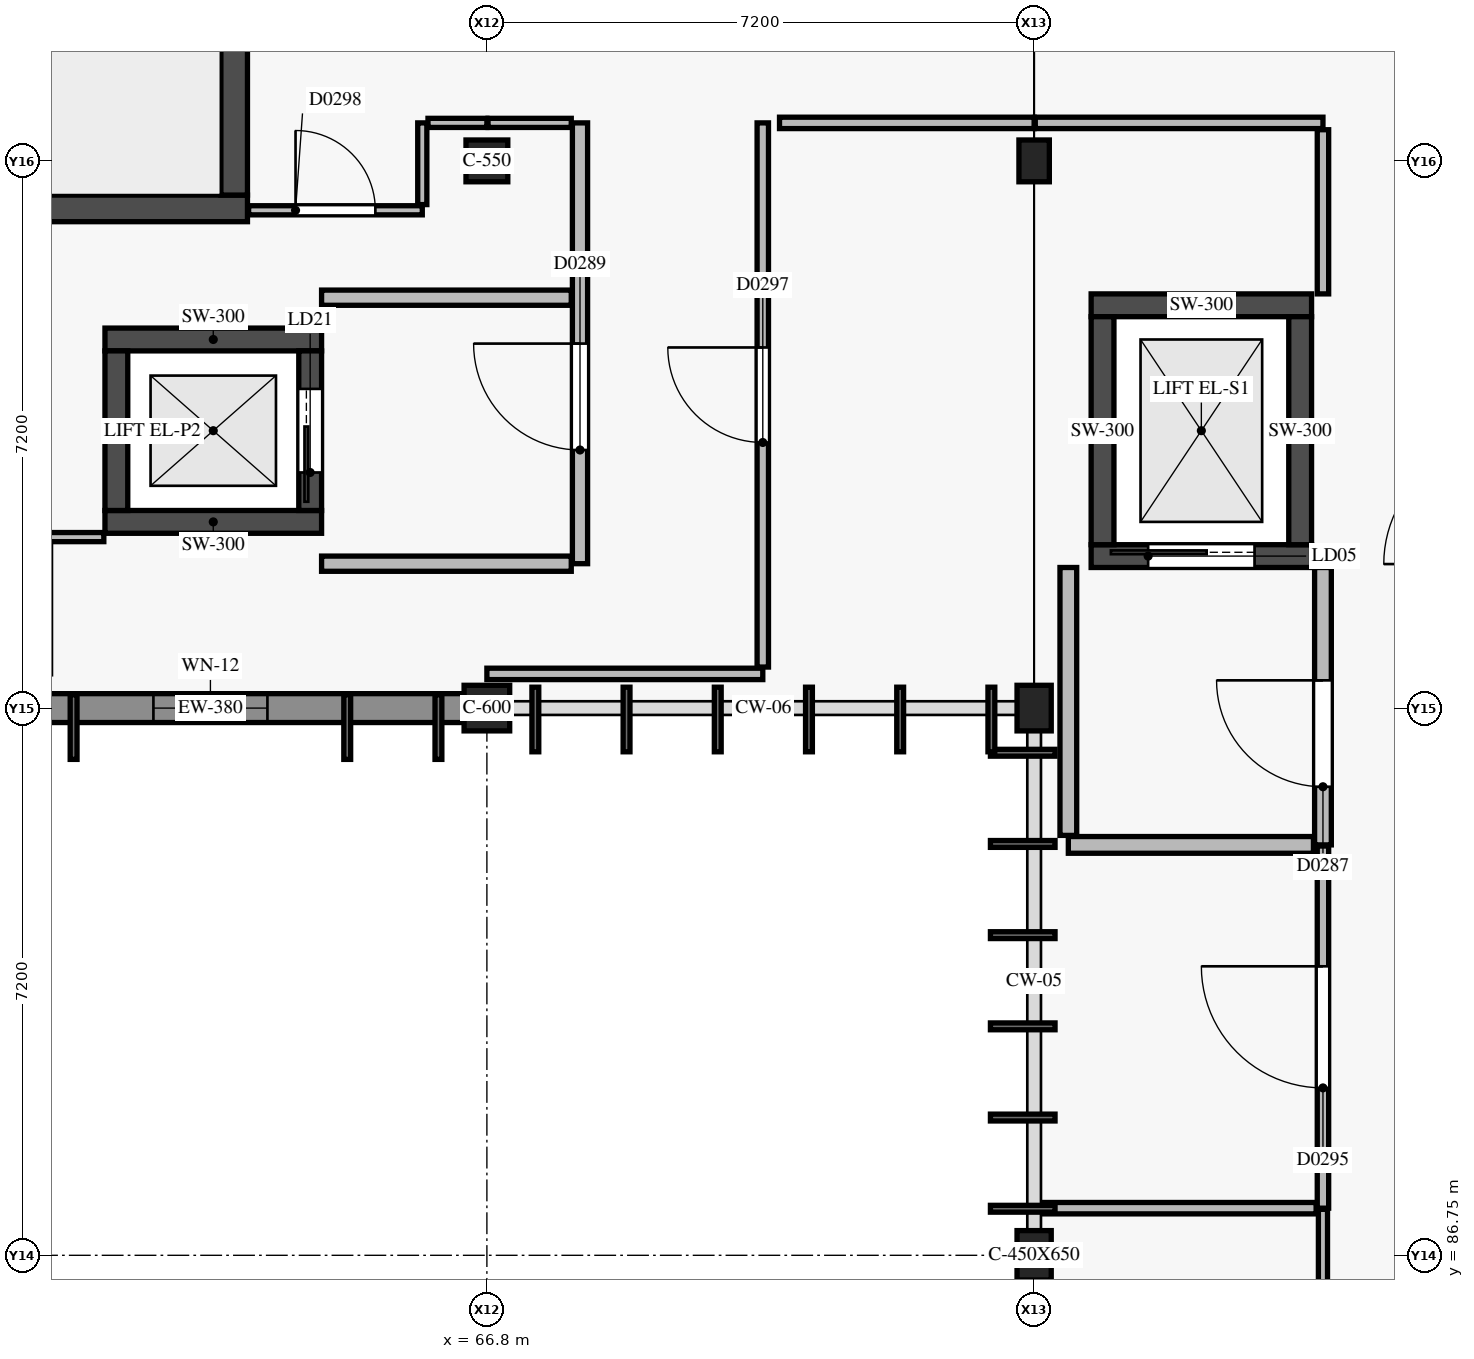
"""IFC4 building model, lengths in metres.
Left out: names, types, materials, properties, quantities, classifications, styles, units other than length and angle.
Written with IfcOpenShell. Run it as: python <this file> out.ifc"""

import sys

from ifc_helpers import new_model, si_unit, direction, frame, frame_2d, origin, origin_2d, place, context, subcontext, project, spatial, rectangle, extrude, element, fill, save


model = new_model("IFC4")
c1 = context("Model", 3, precision=1e-05, world=origin(), true_north=direction((0.0, 1.0)))
c2 = subcontext(c1, "Body", "Model", "MODEL_VIEW")
j1 = project(units=[si_unit("LENGTHUNIT", "METRE"), si_unit("PLANEANGLEUNIT", "RADIAN")], contexts=[c1])
p1 = place(None, origin())
s1 = spatial("IfcSite", under=j1, at=p1, CompositionType="ELEMENT")
p2 = place(p1, origin())
s2 = spatial("IfcBuilding", under=s1, at=p2, CompositionType="ELEMENT")
p3 = place(p2, frame((0.0, 0.0, 17.4)))
s3 = spatial("IfcBuildingStorey", under=s2, at=p3, CompositionType="ELEMENT", Elevation=17.4)
p4 = place(p3, frame((66.8, 93.95, 0.0), z_axis=(0.0, 0.0, 1.0), x_axis=(1.0, 0.0, 0.0)))
e1 = element("IfcColumn", 1, at=p4, inside=s3, PredefinedType="COLUMN", context=c2, shape_type="SweptSolid", body=[
    extrude(rectangle(XDim=0.6, YDim=0.6, at=origin_2d()), origin(), (0.0, 0.0, 1.0), 4.2),
])
p5 = place(p3, frame((66.8, 101.15, 0.0), z_axis=(0.0, 0.0, 1.0), x_axis=(1.0, 0.0, 0.0)))
e2 = element("IfcColumn", 2, at=p5, inside=s3, PredefinedType="COLUMN", context=c2, shape_type="SweptSolid", body=[
    extrude(rectangle(XDim=0.55, YDim=0.55, at=origin_2d()), origin(), (0.0, 0.0, 1.0), 4.2),
])
p6 = place(p3, frame((74.0, 86.75, 0.0), z_axis=(0.0, 0.0, 1.0), x_axis=(1.0, 0.0, 0.0)))
e3 = element("IfcColumn", 3, at=p6, inside=s3, PredefinedType="COLUMN", context=c2, shape_type="SweptSolid", body=[
    extrude(rectangle(XDim=0.45, YDim=0.65, at=origin_2d()), origin(), (0.0, 0.0, 1.0), 4.2),
])
p7 = place(p3, frame((74.0, 93.95, 0.0), z_axis=(0.0, 0.0, 1.0), x_axis=(1.0, 0.0, 0.0)))
e4 = element("IfcColumn", 4, at=p7, inside=s3, PredefinedType="COLUMN", context=c2, shape_type="SweptSolid", body=[
    extrude(rectangle(XDim=0.45, YDim=0.6, at=origin_2d()), origin(), (0.0, 0.0, 1.0), 4.2),
])
p8 = place(p3, frame((74.0, 101.15, 0.0), z_axis=(0.0, 0.0, 1.0), x_axis=(1.0, 0.0, 0.0)))
e5 = element("IfcColumn", 5, at=p8, inside=s3, PredefinedType="COLUMN", context=c2, shape_type="SweptSolid", body=[
    extrude(rectangle(XDim=0.4, YDim=0.55, at=origin_2d()), origin(), (0.0, 0.0, 1.0), 4.2),
])
p9 = place(p3, frame((59.65, 100.525, 0.0), z_axis=(0.0, 0.0, 1.0), x_axis=(1.0, 0.0, 0.0)))
e6 = element("IfcWall", 6, at=p9, inside=s3, PredefinedType="SHEAR", context=c2, shape_type="SweptSolid", body=[
    extrude(rectangle(XDim=4.0, YDim=0.35, at=frame_2d((2.0, 0.0))), origin(), (0.0, 0.0, 1.0), 3.92),
])
p10 = place(p3, frame((63.475, 100.7, 0.0), z_axis=(0.0, 0.0, 1.0), x_axis=(0.0, 1.0, 0.0)))
e7 = element("IfcWall", 7, at=p10, inside=s3, PredefinedType="SHEAR", context=c2, shape_type="SweptSolid", body=[
    extrude(rectangle(XDim=7.3, YDim=0.35, at=frame_2d((3.65, 0.0))), origin(), (0.0, 0.0, 1.0), 3.92),
])
p11 = place(p10, frame((5.68, 0.0, 0.0)))
e8 = element("IfcOpeningElement", 8, at=p11, cuts=e7, PredefinedType="OPENING", context=c2, shape_type="SweptSolid", body=[
    extrude(rectangle(XDim=1.5, YDim=2.15, at=frame_2d((0.75, 1.075))), frame((0.0, 0.185, 0.0), z_axis=(0.0, -1.0, 0.0), x_axis=(1.0, 0.0, 0.0)), (0.0, 0.0, 1.0), 0.37),
])
p12 = place(p3, frame((74.75, 95.95, 0.0), z_axis=(0.0, 0.0, 1.0), x_axis=(1.0, 0.0, 0.0)))
e9 = element("IfcWall", 9, at=p12, inside=s3, PredefinedType="SHEAR", context=c2, shape_type="SweptSolid", body=[
    extrude(rectangle(XDim=2.9, YDim=0.3, at=frame_2d((1.45, 0.0))), origin(), (0.0, 0.0, 1.0), 3.92),
])
p13 = place(p12, frame((0.75, 0.0, 0.0)))
e10 = element("IfcOpeningElement", 10, at=p13, cuts=e9, PredefinedType="OPENING", context=c2, shape_type="SweptSolid", body=[
    extrude(rectangle(XDim=1.4, YDim=2.15, at=frame_2d((0.7, 1.075))), frame((0.0, 0.16, 0.0), z_axis=(0.0, -1.0, 0.0), x_axis=(1.0, 0.0, 0.0)), (0.0, 0.0, 1.0), 0.32),
])
p14 = place(p3, frame((74.75, 99.25, 0.0), z_axis=(0.0, 0.0, 1.0), x_axis=(1.0, 0.0, 0.0)))
e11 = element("IfcWall", 11, at=p14, inside=s3, PredefinedType="SHEAR", context=c2, shape_type="SweptSolid", body=[
    extrude(rectangle(XDim=2.9, YDim=0.3, at=frame_2d((1.45, 0.0))), origin(), (0.0, 0.0, 1.0), 3.92),
])
for number, where, z_axis, x_axis in (
    (12, (74.9, 96.1, 0.0), (0.0, 0.0, 1.0), (0.0, 1.0, 0.0)),
    (13, (77.5, 96.1, 0.0), (0.0, 0.0, 1.0), (0.0, 1.0, 0.0)),
):
    element("IfcWall", number, at=place(p3, frame(where, z_axis=z_axis, x_axis=x_axis)), inside=s3, PredefinedType="SHEAR", context=c2, shape_type="SweptSolid", body=[
        extrude(rectangle(XDim=3.0, YDim=0.3, at=frame_2d((1.5, 0.0))), origin(), (0.0, 0.0, 1.0), 3.92),
    ])
for number, where, z_axis, x_axis in (
    (14, (61.775, 96.4, 0.0), (0.0, 0.0, 1.0), (1.0, 0.0, 0.0)),
    (15, (61.775, 98.8, 0.0), (0.0, 0.0, 1.0), (1.0, 0.0, 0.0)),
):
    element("IfcWall", number, at=place(p3, frame(where, z_axis=z_axis, x_axis=x_axis)), inside=s3, PredefinedType="SHEAR", context=c2, shape_type="SweptSolid", body=[
        extrude(rectangle(XDim=2.85, YDim=0.3, at=frame_2d((1.425, 0.0))), origin(), (0.0, 0.0, 1.0), 3.92),
    ])
p15 = place(p3, frame((61.925, 96.55, 0.0), z_axis=(0.0, 0.0, 1.0), x_axis=(0.0, 1.0, 0.0)))
e16 = element("IfcWall", 16, at=p15, inside=s3, PredefinedType="SHEAR", context=c2, shape_type="SweptSolid", body=[
    extrude(rectangle(XDim=2.1, YDim=0.3, at=frame_2d((1.05, 0.0))), origin(), (0.0, 0.0, 1.0), 3.92),
])
p16 = place(p3, frame((64.475, 96.55, 0.0), z_axis=(0.0, 0.0, 1.0), x_axis=(0.0, 1.0, 0.0)))
e17 = element("IfcWall", 17, at=p16, inside=s3, PredefinedType="SHEAR", context=c2, shape_type="SweptSolid", body=[
    extrude(rectangle(XDim=2.1, YDim=0.3, at=frame_2d((1.05, 0.0))), origin(), (0.0, 0.0, 1.0), 3.92),
])
p17 = place(p16, frame((0.5, 0.0, 0.0)))
e18 = element("IfcOpeningElement", 18, at=p17, cuts=e17, PredefinedType="OPENING", context=c2, shape_type="SweptSolid", body=[
    extrude(rectangle(XDim=1.1, YDim=2.15, at=frame_2d((0.55, 1.075))), frame((0.0, 0.16, 0.0), z_axis=(0.0, -1.0, 0.0), x_axis=(1.0, 0.0, 0.0)), (0.0, 0.0, 1.0), 0.32),
])
p18 = place(p3, frame((66.5, 93.95, 0.0), z_axis=(0.0, 0.0, 1.0), x_axis=(-1.0, 0.0, 0.0)))
e19 = element("IfcWall", 19, at=p18, inside=s3, PredefinedType="USERDEFINED", context=c2, shape_type="SweptSolid", body=[
    extrude(rectangle(XDim=6.675, YDim=0.38, at=frame_2d((3.337, 0.0))), origin(), (0.0, 0.0, 1.0), 3.1),
])
p19 = place(p18, frame((2.587, 0.0, 0.9)))
e20 = element("IfcOpeningElement", 20, at=p19, cuts=e19, PredefinedType="OPENING", context=c2, shape_type="SweptSolid", body=[
    extrude(rectangle(XDim=1.5, YDim=1.5, at=frame_2d((0.75, 0.75))), frame((0.0, 0.2, 0.0), z_axis=(0.0, -1.0, 0.0), x_axis=(1.0, 0.0, 0.0)), (0.0, 0.0, 1.0), 0.4),
])
p20 = place(p3, frame((77.8, 92.15, 0.0), z_axis=(0.0, 0.0, 1.0), x_axis=(0.0, 1.0, 0.0)))
e21 = element("IfcWall", 21, at=p20, inside=s3, PredefinedType="PARTITIONING", context=c2, shape_type="SweptSolid", body=[
    extrude(rectangle(XDim=3.65, YDim=0.22, at=frame_2d((1.825, 0.0))), origin(), (0.0, 0.0, 1.0), 3.255),
])
p21 = place(p20, frame((0.765, 0.0, 0.0)))
e22 = element("IfcOpeningElement", 22, at=p21, cuts=e21, PredefinedType="OPENING", context=c2, shape_type="SweptSolid", body=[
    extrude(rectangle(XDim=1.4, YDim=2.2, at=frame_2d((0.7, 1.1))), frame((0.0, 0.12, 0.0), z_axis=(0.0, -1.0, 0.0), x_axis=(1.0, 0.0, 0.0)), (0.0, 0.0, 1.0), 0.24),
])
p22 = place(p3, frame((68.025, 95.85, 0.0), z_axis=(0.0, 0.0, 1.0), x_axis=(0.0, 1.0, 0.0)))
e23 = element("IfcWall", 23, at=p22, inside=s3, PredefinedType="PARTITIONING", context=c2, shape_type="SweptSolid", body=[
    extrude(rectangle(XDim=5.8, YDim=0.2, at=frame_2d((2.9, 0.0))), origin(), (0.0, 0.0, 1.0), 3.425),
])
p23 = place(p22, frame((1.496, 0.0, 0.0)))
e24 = element("IfcOpeningElement", 24, at=p23, cuts=e23, PredefinedType="OPENING", context=c2, shape_type="SweptSolid", body=[
    extrude(rectangle(XDim=1.4, YDim=2.2, at=frame_2d((0.7, 1.1))), frame((0.0, 0.11, 0.0), z_axis=(0.0, -1.0, 0.0), x_axis=(1.0, 0.0, 0.0)), (0.0, 0.0, 1.0), 0.22),
])
p24 = place(p3, frame((64.625, 95.85, 0.0), z_axis=(0.0, 0.0, 1.0), x_axis=(1.0, 0.0, 0.0)))
e25 = element("IfcWall", 25, at=p24, inside=s3, PredefinedType="PARTITIONING", context=c2, shape_type="SweptSolid", body=[
    extrude(rectangle(XDim=3.285, YDim=0.2, at=frame_2d((1.643, 0.0))), origin(), (0.0, 0.0, 1.0), 3.325),
])
p25 = place(p3, frame((74.45, 92.15, 0.0), z_axis=(0.0, 0.0, 1.0), x_axis=(1.0, 0.0, 0.0)))
e26 = element("IfcWall", 26, at=p25, inside=s3, PredefinedType="PARTITIONING", context=c2, shape_type="SweptSolid", body=[
    extrude(rectangle(XDim=3.225, YDim=0.22, at=frame_2d((1.613, 0.0))), origin(), (0.0, 0.0, 1.0), 3.92),
])
p26 = place(p3, frame((74.45, 92.275, 0.0), z_axis=(0.0, 0.0, 1.0), x_axis=(0.0, 1.0, 0.0)))
e27 = element("IfcWall", 27, at=p26, inside=s3, PredefinedType="PARTITIONING", context=c2, shape_type="SweptSolid", body=[
    extrude(rectangle(XDim=3.525, YDim=0.22, at=frame_2d((1.763, 0.0))), origin(), (0.0, 0.0, 1.0), 3.255),
])
p27 = place(p3, frame((64.625, 99.35, 0.0), z_axis=(0.0, 0.0, 1.0), x_axis=(1.0, 0.0, 0.0)))
e28 = element("IfcWall", 28, at=p27, inside=s3, PredefinedType="PARTITIONING", context=c2, shape_type="SweptSolid", body=[
    extrude(rectangle(XDim=3.285, YDim=0.2, at=frame_2d((1.643, 0.0))), origin(), (0.0, 0.0, 1.0), 3.325),
])
p28 = place(p3, frame((77.8, 87.37, 0.0), z_axis=(0.0, 0.0, 1.0), x_axis=(0.0, 1.0, 0.0)))
e29 = element("IfcWall", 29, at=p28, inside=s3, PredefinedType="PARTITIONING", context=c2, shape_type="SweptSolid", body=[
    extrude(rectangle(XDim=4.765, YDim=0.15, at=frame_2d((2.382, 0.0))), origin(), (0.0, 0.0, 1.0), 3.445),
])
p29 = place(p28, frame((1.583, 0.0, 0.0)))
e30 = element("IfcOpeningElement", 30, at=p29, cuts=e29, PredefinedType="OPENING", context=c2, shape_type="SweptSolid", body=[
    extrude(rectangle(XDim=1.6, YDim=2.25, at=frame_2d((0.8, 1.125))), frame((0.0, 0.085, 0.0), z_axis=(0.0, -1.0, 0.0), x_axis=(1.0, 0.0, 0.0)), (0.0, 0.0, 1.0), 0.17),
])
p30 = place(p3, frame((66.8, 94.4, 0.0), z_axis=(0.0, 0.0, 1.0), x_axis=(1.0, 0.0, 0.0)))
e31 = element("IfcWall", 31, at=p30, inside=s3, PredefinedType="PARTITIONING", context=c2, shape_type="SweptSolid", body=[
    extrude(rectangle(XDim=3.63, YDim=0.15, at=frame_2d((1.815, 0.0))), origin(), (0.0, 0.0, 1.0), 3.325),
])
p31 = place(p3, frame((70.43, 94.49, 0.0), z_axis=(0.0, 0.0, 1.0), x_axis=(0.0, 1.0, 0.0)))
e32 = element("IfcWall", 32, at=p31, inside=s3, PredefinedType="PARTITIONING", context=c2, shape_type="SweptSolid", body=[
    extrude(rectangle(XDim=7.16, YDim=0.15, at=frame_2d((3.58, 0.0))), origin(), (0.0, 0.0, 1.0), 3.425),
])
p32 = place(p31, frame((2.955, 0.0, 0.0)))
e33 = element("IfcOpeningElement", 33, at=p32, cuts=e32, PredefinedType="OPENING", context=c2, shape_type="SweptSolid", body=[
    extrude(rectangle(XDim=1.25, YDim=2.15, at=frame_2d((0.625, 1.075))), frame((0.0, 0.085, 0.0), z_axis=(0.0, -1.0, 0.0), x_axis=(1.0, 0.0, 0.0)), (0.0, 0.0, 1.0), 0.17),
])
p33 = place(p3, frame((70.65, 101.65, 0.0), z_axis=(0.0, 0.0, 1.0), x_axis=(1.0, 0.0, 0.0)))
e34 = element("IfcWall", 34, at=p33, inside=s3, PredefinedType="PARTITIONING", context=c2, shape_type="SweptSolid", body=[
    extrude(rectangle(XDim=3.35, YDim=0.15, at=frame_2d((1.675, 0.0))), origin(), (0.0, 0.0, 1.0), 3.185),
])
p34 = place(p3, frame((74.015, 101.65, 0.0), z_axis=(0.0, 0.0, 1.0), x_axis=(1.0, 0.0, 0.0)))
e35 = element("IfcWall", 35, at=p34, inside=s3, PredefinedType="PARTITIONING", context=c2, shape_type="SweptSolid", body=[
    extrude(rectangle(XDim=3.785, YDim=0.15, at=frame_2d((1.893, 0.0))), origin(), (0.0, 0.0, 1.0), 3.185),
])
p35 = place(p3, frame((77.8, 99.4, 0.0), z_axis=(0.0, 0.0, 1.0), x_axis=(0.0, 1.0, 0.0)))
e36 = element("IfcWall", 36, at=p35, inside=s3, PredefinedType="PARTITIONING", context=c2, shape_type="SweptSolid", body=[
    extrude(rectangle(XDim=2.16, YDim=0.15, at=frame_2d((1.08, 0.0))), origin(), (0.0, 0.0, 1.0), 3.185),
])
p36 = place(p3, frame((77.8, 74.55, 0.0), z_axis=(0.0, 0.0, 1.0), x_axis=(0.0, 1.0, 0.0)))
e37 = element("IfcWall", 37, at=p36, inside=s3, PredefinedType="PARTITIONING", context=c2, shape_type="SweptSolid", body=[
    extrude(rectangle(XDim=12.805, YDim=0.12, at=frame_2d((6.402, 0.0))), origin(), (0.0, 0.0, 1.0), 3.105),
])
p37 = place(p36, frame((5.778, 0.0, 0.0)))
e38 = element("IfcOpeningElement", 38, at=p37, cuts=e37, PredefinedType="OPENING", context=c2, shape_type="SweptSolid", body=[
    extrude(rectangle(XDim=1.25, YDim=2.15, at=frame_2d((0.625, 1.075))), frame((0.0, 0.07, 0.0), z_axis=(0.0, -1.0, 0.0), x_axis=(1.0, 0.0, 0.0)), (0.0, 0.0, 1.0), 0.14),
])
p38 = place(p3, frame((63.665, 100.5, 0.0), z_axis=(0.0, 0.0, 1.0), x_axis=(1.0, 0.0, 0.0)))
e39 = element("IfcWall", 39, at=p38, inside=s3, PredefinedType="PARTITIONING", context=c2, shape_type="SweptSolid", body=[
    extrude(rectangle(XDim=2.285, YDim=0.12, at=frame_2d((1.143, 0.0))), origin(), (0.0, 0.0, 1.0), 3.92),
])
p39 = place(p38, frame((0.617, 0.0, 0.0)))
e40 = element("IfcOpeningElement", 40, at=p39, cuts=e39, PredefinedType="OPENING", context=c2, shape_type="SweptSolid", body=[
    extrude(rectangle(XDim=1.05, YDim=2.15, at=frame_2d((0.525, 1.075))), frame((0.0, 0.07, 0.0), z_axis=(0.0, -1.0, 0.0), x_axis=(1.0, 0.0, 0.0)), (0.0, 0.0, 1.0), 0.14),
])
p40 = place(p3, frame((65.95, 100.575, 0.0), z_axis=(0.0, 0.0, 1.0), x_axis=(0.0, 1.0, 0.0)))
e41 = element("IfcWall", 41, at=p40, inside=s3, PredefinedType="PARTITIONING", context=c2, shape_type="SweptSolid", body=[
    extrude(rectangle(XDim=1.075, YDim=0.12, at=frame_2d((0.538, 0.0))), origin(), (0.0, 0.0, 1.0), 3.92),
])
p41 = place(p3, frame((66.025, 101.65, 0.0), z_axis=(0.0, 0.0, 1.0), x_axis=(1.0, 0.0, 0.0)))
e42 = element("IfcWall", 42, at=p41, inside=s3, PredefinedType="PARTITIONING", context=c2, shape_type="SweptSolid", body=[
    extrude(rectangle(XDim=0.775, YDim=0.12, at=frame_2d((0.388, 0.0))), origin(), (0.0, 0.0, 1.0), 3.325),
])
p42 = place(p3, frame((66.815, 101.65, 0.0), z_axis=(0.0, 0.0, 1.0), x_axis=(1.0, 0.0, 0.0)))
e43 = element("IfcWall", 43, at=p42, inside=s3, PredefinedType="PARTITIONING", context=c2, shape_type="SweptSolid", body=[
    extrude(rectangle(XDim=1.095, YDim=0.12, at=frame_2d((0.547, 0.0))), origin(), (0.0, 0.0, 1.0), 3.325),
])
p43 = place(p3, frame((61.0, 96.2, 0.0), z_axis=(0.0, 0.0, 1.0), x_axis=(1.0, 0.0, 0.0)))
e44 = element("IfcWall", 44, at=p43, inside=s3, PredefinedType="PARTITIONING", context=c2, shape_type="SweptSolid", body=[
    extrude(rectangle(XDim=0.76, YDim=0.12, at=frame_2d((0.38, 0.0))), origin(), (0.0, 0.0, 1.0), 3.485),
])
p44 = place(p3, frame((74.105, 87.37, 0.0), z_axis=(0.0, 0.0, 1.0), x_axis=(1.0, 0.0, 0.0)))
e45 = element("IfcWall", 45, at=p44, inside=s3, PredefinedType="PARTITIONING", context=c2, shape_type="SweptSolid", body=[
    extrude(rectangle(XDim=3.605, YDim=0.15, at=frame_2d((1.802, 0.0))), origin(), (0.0, 0.0, 1.0), 3.92),
])
p45 = place(p19, origin())
e46 = element("IfcWindow", 46, at=p45, inside=s3, PartitioningType="SINGLE_PANEL", PredefinedType="WINDOW", context=c2, shape_type="SweptSolid", body=[
    extrude(rectangle(XDim=1.5, YDim=1.5, at=frame_2d((0.75, 0.75))), frame((0.0, 0.03, 0.0), z_axis=(0.0, -1.0, 0.0), x_axis=(1.0, 0.0, 0.0)), (0.0, 0.0, 1.0), 0.06),
])
fill(e20, e46)
p46 = place(p13, origin())
e47 = element("IfcDoor", 47, at=p46, inside=s3, OperationType="SLIDING_TO_LEFT", PredefinedType="DOOR", context=c2, shape_type="SweptSolid", body=[
    extrude(rectangle(XDim=1.4, YDim=2.15, at=frame_2d((0.7, 1.075))), frame((0.0, 0.025, 0.0), z_axis=(0.0, -1.0, 0.0), x_axis=(1.0, 0.0, 0.0)), (0.0, 0.0, 1.0), 0.05),
])
fill(e10, e47)
p47 = place(p17, origin())
e48 = element("IfcDoor", 48, at=p47, inside=s3, OperationType="SLIDING_TO_LEFT", PredefinedType="DOOR", context=c2, shape_type="SweptSolid", body=[
    extrude(rectangle(XDim=1.1, YDim=2.15, at=frame_2d((0.55, 1.075))), frame((0.0, 0.025, 0.0), z_axis=(0.0, -1.0, 0.0), x_axis=(1.0, 0.0, 0.0)), (0.0, 0.0, 1.0), 0.05),
])
fill(e18, e48)
p48 = place(p21, origin())
e49 = element("IfcDoor", 49, at=p48, inside=s3, OperationType="SINGLE_SWING_RIGHT", PredefinedType="DOOR", context=c2, shape_type="SweptSolid", body=[
    extrude(rectangle(XDim=1.4, YDim=2.2, at=frame_2d((0.7, 1.1))), frame((0.0, 0.025, 0.0), z_axis=(0.0, -1.0, 0.0), x_axis=(1.0, 0.0, 0.0)), (0.0, 0.0, 1.0), 0.05),
])
fill(e22, e49)
p49 = place(p23, origin())
e50 = element("IfcDoor", 50, at=p49, inside=s3, OperationType="SINGLE_SWING_RIGHT", PredefinedType="DOOR", context=c2, shape_type="SweptSolid", body=[
    extrude(rectangle(XDim=1.4, YDim=2.2, at=frame_2d((0.7, 1.1))), frame((0.0, 0.025, 0.0), z_axis=(0.0, -1.0, 0.0), x_axis=(1.0, 0.0, 0.0)), (0.0, 0.0, 1.0), 0.05),
])
fill(e24, e50)
p50 = place(p29, origin())
e51 = element("IfcDoor", 51, at=p50, inside=s3, OperationType="SINGLE_SWING_RIGHT", PredefinedType="DOOR", context=c2, shape_type="SweptSolid", body=[
    extrude(rectangle(XDim=1.6, YDim=2.25, at=frame_2d((0.8, 1.125))), frame((0.0, 0.025, 0.0), z_axis=(0.0, -1.0, 0.0), x_axis=(1.0, 0.0, 0.0)), (0.0, 0.0, 1.0), 0.05),
])
fill(e30, e51)
p51 = place(p32, origin())
e52 = element("IfcDoor", 52, at=p51, inside=s3, OperationType="SINGLE_SWING_RIGHT", PredefinedType="DOOR", context=c2, shape_type="SweptSolid", body=[
    extrude(rectangle(XDim=1.25, YDim=2.15, at=frame_2d((0.625, 1.075))), frame((0.0, 0.025, 0.0), z_axis=(0.0, -1.0, 0.0), x_axis=(1.0, 0.0, 0.0)), (0.0, 0.0, 1.0), 0.05),
])
fill(e33, e52)
p52 = place(p39, origin())
e53 = element("IfcDoor", 53, at=p52, inside=s3, OperationType="SINGLE_SWING_LEFT", PredefinedType="DOOR", context=c2, shape_type="SweptSolid", body=[
    extrude(rectangle(XDim=1.05, YDim=2.15, at=frame_2d((0.525, 1.075))), frame((0.0, 0.025, 0.0), z_axis=(0.0, -1.0, 0.0), x_axis=(1.0, 0.0, 0.0)), (0.0, 0.0, 1.0), 0.05),
])
fill(e40, e53)
save(model, sys.argv[1])
